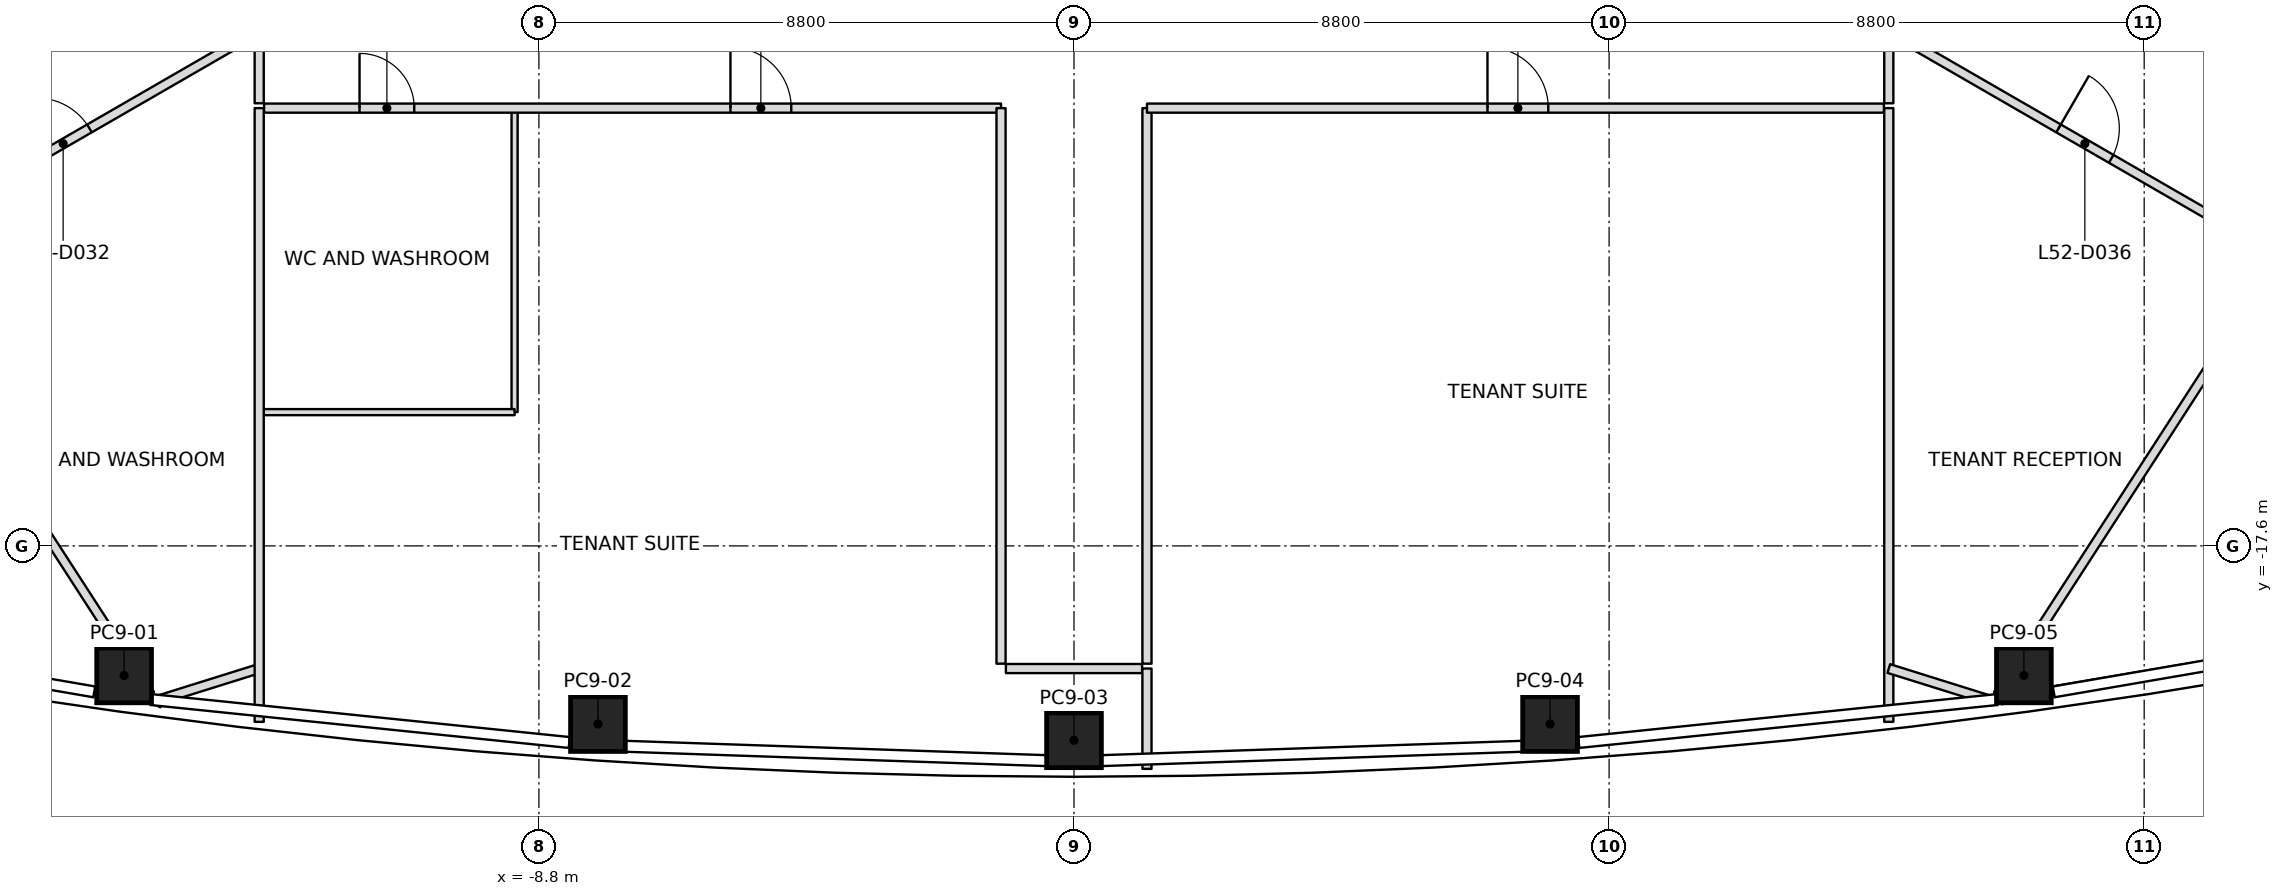
"""IFC4 building model, lengths in metres.
Left out: names, types, materials, properties, quantities, classifications, styles, units other than length and angle.
Written with IfcOpenShell. Run it as: python <this file> out.ifc"""

import sys

from ifc_helpers import new_model, si_unit, direction, frame, frame_2d, origin, origin_2d, place, context, subcontext, project, spatial, rectangle, extrude, element, fill, save


model = new_model("IFC4")
c1 = context("Model", 3, precision=1e-05, world=origin(), true_north=direction((0.0, 1.0)))
c2 = subcontext(c1, "Body", "Model", "MODEL_VIEW")
j1 = project(units=[si_unit("LENGTHUNIT", "METRE"), si_unit("PLANEANGLEUNIT", "RADIAN")], contexts=[c1])
p1 = place(None, origin())
s1 = spatial("IfcSite", under=j1, at=p1, CompositionType="ELEMENT")
p2 = place(p1, origin())
s2 = spatial("IfcBuilding", under=s1, at=p2, CompositionType="ELEMENT")
p3 = place(p2, frame((0.0, 0.0, 235.0)))
s3 = spatial("IfcBuildingStorey", under=s2, at=p3, CompositionType="ELEMENT", Elevation=235.0)
p4 = place(p3, frame((-15.622, -19.73, 0.0), z_axis=(0.017513460473, 0.010373826761, 0.999792809746), x_axis=(-0.990562226516, 0.136133815888, 0.015939246235)))
e1 = element("IfcColumn", 1, at=p4, inside=s3, PredefinedType="COLUMN", context=c2, shape_type="SweptSolid", body=[
    extrude(rectangle(XDim=0.9, YDim=0.9, at=origin_2d()), origin(), (0.0, 0.0, 1.0), 4.001),
])
p5 = place(p3, frame((-7.829, -20.53, 0.0), z_axis=(0.008788174922, 0.01116830563, 0.999899013366), x_axis=(-0.997637315828, 0.06823259627, 0.008006177268)))
e2 = element("IfcColumn", 2, at=p5, inside=s3, PredefinedType="COLUMN", context=c2, shape_type="SweptSolid", body=[
    extrude(rectangle(XDim=0.9, YDim=0.9, at=origin_2d()), origin(), (0.0, 0.0, 1.0), 4.0),
])
p6 = place(p3, frame((0.0, -20.797, 0.0), z_axis=(0.0, 0.01141283087, 0.999934871525), x_axis=(1.0, 0.0, 0.0)))
e3 = element("IfcColumn", 3, at=p6, inside=s3, PredefinedType="COLUMN", context=c2, shape_type="SweptSolid", body=[
    extrude(rectangle(XDim=0.9, YDim=0.9, at=origin_2d()), origin(), (0.0, 0.0, 1.0), 4.0),
])
p7 = place(p3, frame((7.829, -20.53, 0.0), z_axis=(-0.008788174922, 0.01116830563, 0.999899013366), x_axis=(0.997637315828, 0.06823259627, 0.008006177268)))
e4 = element("IfcColumn", 4, at=p7, inside=s3, PredefinedType="COLUMN", context=c2, shape_type="SweptSolid", body=[
    extrude(rectangle(XDim=0.9, YDim=0.9, at=origin_2d()), origin(), (0.0, 0.0, 1.0), 4.0),
])
p8 = place(p3, frame((15.622, -19.73, 0.0), z_axis=(-0.017513460473, 0.010373826761, 0.999792809746), x_axis=(0.990562226516, 0.136133815888, 0.015939246235)))
e5 = element("IfcColumn", 5, at=p8, inside=s3, PredefinedType="COLUMN", context=c2, shape_type="SweptSolid", body=[
    extrude(rectangle(XDim=0.9, YDim=0.9, at=origin_2d()), origin(), (0.0, 0.0, 1.0), 4.001),
])
p9 = place(p3, frame((-19.849, -12.845, 0.0), z_axis=(0.0, 0.0, 1.0), x_axis=(0.543041092905, -0.839706122055, 0.0)))
e6 = element("IfcWall", 6, at=p9, inside=s3, PredefinedType="PARTITIONING", context=c2, shape_type="SweptSolid", body=[
    extrude(rectangle(XDim=8.573, YDim=0.15, at=frame_2d((4.287, 0.0))), origin(), (0.0, 0.0, 1.0), 3.45),
])
p10 = place(p3, frame((-15.043, -20.131, 0.0), z_axis=(0.0, 0.0, 1.0), x_axis=(0.954404246186, 0.298517227076, 0.0)))
e7 = element("IfcWall", 7, at=p10, inside=s3, PredefinedType="PARTITIONING", context=c2, shape_type="SweptSolid", body=[
    extrude(rectangle(XDim=1.722, YDim=0.15, at=frame_2d((0.861, 0.0))), origin(), (0.0, 0.0, 1.0), 3.234),
])
p11 = place(p3, frame((-13.4, -20.494, 0.0), z_axis=(0.0, 0.0, 1.0), x_axis=(0.0, 1.0, 0.0)))
e8 = element("IfcWall", 8, at=p11, inside=s3, PredefinedType="PARTITIONING", context=c2, shape_type="SweptSolid", body=[
    extrude(rectangle(XDim=10.094, YDim=0.15, at=frame_2d((5.047, 0.0))), origin(), (0.0, 0.0, 1.0), 3.234),
])
p12 = place(p3, frame((-15.093, -20.218, 0.0), z_axis=(0.0, 0.0, 1.0), x_axis=(0.500074377092, 0.865982457891, 0.0)))
e9 = element("IfcWall", 9, at=p12, inside=s3, PredefinedType="PARTITIONING", context=c2, shape_type="SweptSolid", body=[
    extrude(rectangle(XDim=0.1, YDim=0.15, at=frame_2d((0.05, 0.0))), origin(), (0.0, 0.0, 1.0), 3.45),
])
p13 = place(p3, frame((1.2, -19.617, 0.0), z_axis=(0.0, 0.0, 1.0), x_axis=(0.0, -1.0, 0.0)))
e10 = element("IfcWall", 10, at=p13, inside=s3, PredefinedType="PARTITIONING", context=c2, shape_type="SweptSolid", body=[
    extrude(rectangle(XDim=1.65, YDim=0.15, at=frame_2d((0.825, 0.0))), origin(), (0.0, 0.0, 1.0), 3.234),
])
p14 = place(p3, frame((13.4, -10.4, 0.0), z_axis=(0.0, 0.0, 1.0), x_axis=(0.0, -1.0, 0.0)))
e11 = element("IfcWall", 11, at=p14, inside=s3, PredefinedType="PARTITIONING", context=c2, shape_type="SweptSolid", body=[
    extrude(rectangle(XDim=10.094, YDim=0.15, at=frame_2d((5.047, 0.0))), origin(), (0.0, 0.0, 1.0), 3.234),
])
p15 = place(p3, frame((13.4, -19.617, 0.0), z_axis=(0.0, 0.0, 1.0), x_axis=(0.954404246186, -0.298517227076, 0.0)))
e12 = element("IfcWall", 12, at=p15, inside=s3, PredefinedType="PARTITIONING", context=c2, shape_type="SweptSolid", body=[
    extrude(rectangle(XDim=1.722, YDim=0.15, at=frame_2d((0.861, 0.0))), origin(), (0.0, 0.0, 1.0), 3.234),
])
p16 = place(p3, frame((15.243, -20.131, 0.0), z_axis=(0.0, 0.0, 1.0), x_axis=(0.986027984185, 0.166579753886, 0.0)))
e13 = element("IfcWall", 13, at=p16, inside=s3, PredefinedType="PARTITIONING", context=c2, shape_type="SweptSolid", body=[
    extrude(rectangle(XDim=4.483, YDim=0.15, at=frame_2d((2.242, 0.0))), origin(), (0.0, 0.0, 1.0), 3.45),
])
p17 = place(p3, frame((19.849, -12.845, 0.0), z_axis=(0.0, 0.0, 1.0), x_axis=(-0.543041092905, -0.839706122055, 0.0)))
e14 = element("IfcWall", 14, at=p17, inside=s3, PredefinedType="PARTITIONING", context=c2, shape_type="SweptSolid", body=[
    extrude(rectangle(XDim=8.573, YDim=0.15, at=frame_2d((4.287, 0.0))), origin(), (0.0, 0.0, 1.0), 3.45),
])
p18 = place(p3, frame((-13.4, -6.351, 0.0), z_axis=(0.0, 0.0, 1.0), x_axis=(-0.866030434095, -0.499991287145, 0.0)))
e15 = element("IfcWall", 15, at=p18, inside=s3, PredefinedType="PARTITIONING", context=c2, shape_type="SweptSolid", body=[
    extrude(rectangle(XDim=8.752, YDim=0.15, at=frame_2d((4.376, 0.0))), origin(), (0.0, 0.0, 1.0), 3.317),
])
p19 = place(p18, frame((1.05, 0.0, 0.0)))
e16 = element("IfcOpeningElement", 16, at=p19, cuts=e15, PredefinedType="OPENING", context=c2, shape_type="SweptSolid", body=[
    extrude(rectangle(XDim=0.9, YDim=2.1, at=frame_2d((0.45, 1.05))), frame((0.0, 0.075, 0.0), z_axis=(0.0, -1.0, 0.0), x_axis=(1.0, 0.0, 0.0)), (0.0, 0.0, 1.0), 0.15),
])
p20 = place(p18, frame((5.466, 0.0, 0.0)))
e17 = element("IfcOpeningElement", 17, at=p20, cuts=e15, PredefinedType="OPENING", context=c2, shape_type="SweptSolid", body=[
    extrude(rectangle(XDim=1.0, YDim=2.1, at=frame_2d((0.5, 1.05))), frame((0.0, 0.075, 0.0), z_axis=(0.0, -1.0, 0.0), x_axis=(1.0, 0.0, 0.0)), (0.0, 0.0, 1.0), 0.15),
])
p21 = place(p3, frame((-19.78, -12.805, 0.0), z_axis=(0.0, 0.0, 1.0), x_axis=(0.866021670914, 0.500006465466, 0.0)))
e18 = element("IfcWall", 18, at=p21, inside=s3, PredefinedType="PARTITIONING", context=c2, shape_type="SweptSolid", body=[
    extrude(rectangle(XDim=7.367, YDim=0.15, at=frame_2d((3.683, 0.0))), origin(), (0.0, 0.0, 1.0), 3.233),
])
p22 = place(p21, frame((3.143, 0.0, 0.0)))
e19 = element("IfcOpeningElement", 19, at=p22, cuts=e18, PredefinedType="OPENING", context=c2, shape_type="SweptSolid", body=[
    extrude(rectangle(XDim=1.0, YDim=2.1, at=frame_2d((0.5, 1.05))), frame((0.0, 0.075, 0.0), z_axis=(0.0, -1.0, 0.0), x_axis=(1.0, 0.0, 0.0)), (0.0, 0.0, 1.0), 0.15),
])
p23 = place(p3, frame((-13.4, -9.214, 0.0), z_axis=(0.0, 0.0, 1.0), x_axis=(0.0, -1.0, 0.0)))
e20 = element("IfcWall", 20, at=p23, inside=s3, PredefinedType="PARTITIONING", context=c2, shape_type="SweptSolid", body=[
    extrude(rectangle(XDim=1.106, YDim=0.15, at=frame_2d((0.553, 0.0))), origin(), (0.0, 0.0, 1.0), 3.233),
])
p24 = place(p3, frame((-13.32, -10.4, 0.0), z_axis=(0.0, 0.0, 1.0), x_axis=(1.0, 0.0, 0.0)))
e21 = element("IfcWall", 21, at=p24, inside=s3, PredefinedType="PARTITIONING", context=c2, shape_type="SweptSolid", body=[
    extrude(rectangle(XDim=12.12, YDim=0.15, at=frame_2d((6.06, 0.0))), origin(), (0.0, 0.0, 1.0), 3.317),
])
p25 = place(p24, frame((1.57, 0.0, 0.0)))
e22 = element("IfcOpeningElement", 22, at=p25, cuts=e21, PredefinedType="OPENING", context=c2, shape_type="SweptSolid", body=[
    extrude(rectangle(XDim=0.9, YDim=2.1, at=frame_2d((0.45, 1.05))), frame((0.0, 0.075, 0.0), z_axis=(0.0, -1.0, 0.0), x_axis=(1.0, 0.0, 0.0)), (0.0, 0.0, 1.0), 0.15),
])
p26 = place(p24, frame((7.67, 0.0, 0.0)))
e23 = element("IfcOpeningElement", 23, at=p26, cuts=e21, PredefinedType="OPENING", context=c2, shape_type="SweptSolid", body=[
    extrude(rectangle(XDim=1.0, YDim=2.1, at=frame_2d((0.5, 1.05))), frame((0.0, 0.075, 0.0), z_axis=(0.0, -1.0, 0.0), x_axis=(1.0, 0.0, 0.0)), (0.0, 0.0, 1.0), 0.15),
])
p27 = place(p3, frame((-1.2, -10.4, 0.0), z_axis=(0.0, 0.0, 1.0), x_axis=(0.0, -1.0, 0.0)))
e24 = element("IfcWall", 24, at=p27, inside=s3, PredefinedType="PARTITIONING", context=c2, shape_type="SweptSolid", body=[
    extrude(rectangle(XDim=9.137, YDim=0.15, at=frame_2d((4.569, 0.0))), origin(), (0.0, 0.0, 1.0), 3.45),
])
p28 = place(p3, frame((-1.12, -19.617, 0.0), z_axis=(0.0, 0.0, 1.0), x_axis=(1.0, 0.0, 0.0)))
e25 = element("IfcWall", 25, at=p28, inside=s3, PredefinedType="PARTITIONING", context=c2, shape_type="SweptSolid", body=[
    extrude(rectangle(XDim=2.24, YDim=0.15, at=frame_2d((1.12, 0.0))), origin(), (0.0, 0.0, 1.0), 3.45),
])
p29 = place(p3, frame((1.2, -19.537, 0.0), z_axis=(0.0, 0.0, 1.0), x_axis=(0.0, 1.0, 0.0)))
e26 = element("IfcWall", 26, at=p29, inside=s3, PredefinedType="PARTITIONING", context=c2, shape_type="SweptSolid", body=[
    extrude(rectangle(XDim=9.137, YDim=0.15, at=frame_2d((4.569, 0.0))), origin(), (0.0, 0.0, 1.0), 3.45),
])
p30 = place(p3, frame((1.2, -10.4, 0.0), z_axis=(0.0, 0.0, 1.0), x_axis=(1.0, 0.0, 0.0)))
e27 = element("IfcWall", 27, at=p30, inside=s3, PredefinedType="PARTITIONING", context=c2, shape_type="SweptSolid", body=[
    extrude(rectangle(XDim=12.12, YDim=0.15, at=frame_2d((6.06, 0.0))), origin(), (0.0, 0.0, 1.0), 3.317),
])
p31 = place(p30, frame((5.6, 0.0, 0.0)))
e28 = element("IfcOpeningElement", 28, at=p31, cuts=e27, PredefinedType="OPENING", context=c2, shape_type="SweptSolid", body=[
    extrude(rectangle(XDim=1.0, YDim=2.1, at=frame_2d((0.5, 1.05))), frame((0.0, 0.075, 0.0), z_axis=(0.0, -1.0, 0.0), x_axis=(1.0, 0.0, 0.0)), (0.0, 0.0, 1.0), 0.15),
])
p32 = place(p3, frame((13.4, -10.32, 0.0), z_axis=(0.0, 0.0, 1.0), x_axis=(0.0, 1.0, 0.0)))
e29 = element("IfcWall", 29, at=p32, inside=s3, PredefinedType="PARTITIONING", context=c2, shape_type="SweptSolid", body=[
    extrude(rectangle(XDim=1.198, YDim=0.15, at=frame_2d((0.599, 0.0))), origin(), (0.0, 0.0, 1.0), 3.233),
])
p33 = place(p3, frame((13.479, -9.168, 0.0), z_axis=(0.0, 0.0, 1.0), x_axis=(0.866026872144, -0.499997456718, 0.0)))
e30 = element("IfcWall", 30, at=p33, inside=s3, PredefinedType="PARTITIONING", context=c2, shape_type="SweptSolid", body=[
    extrude(rectangle(XDim=7.275, YDim=0.15, at=frame_2d((3.637, 0.0))), origin(), (0.0, 0.0, 1.0), 3.233),
])
p34 = place(p33, frame((3.132, 0.0, 0.0)))
e31 = element("IfcOpeningElement", 31, at=p34, cuts=e30, PredefinedType="OPENING", context=c2, shape_type="SweptSolid", body=[
    extrude(rectangle(XDim=1.0, YDim=2.1, at=frame_2d((0.5, 1.05))), frame((0.0, 0.075, 0.0), z_axis=(0.0, -1.0, 0.0), x_axis=(1.0, 0.0, 0.0)), (0.0, 0.0, 1.0), 0.15),
])
p35 = place(p3, frame((20.979, -10.727, 0.0), z_axis=(0.0, 0.0, 1.0), x_axis=(-0.866030434095, 0.499991287145, 0.0)))
e32 = element("IfcWall", 32, at=p35, inside=s3, PredefinedType="PARTITIONING", context=c2, shape_type="SweptSolid", body=[
    extrude(rectangle(XDim=8.752, YDim=0.15, at=frame_2d((4.376, 0.0))), origin(), (0.0, 0.0, 1.0), 3.317),
])
p36 = place(p35, frame((0.97, 0.0, 0.0)))
e33 = element("IfcOpeningElement", 33, at=p36, cuts=e32, PredefinedType="OPENING", context=c2, shape_type="SweptSolid", body=[
    extrude(rectangle(XDim=0.9, YDim=2.1, at=frame_2d((0.45, 1.05))), frame((0.0, 0.075, 0.0), z_axis=(0.0, -1.0, 0.0), x_axis=(1.0, 0.0, 0.0)), (0.0, 0.0, 1.0), 0.15),
])
p37 = place(p35, frame((5.386, 0.0, 0.0)))
e34 = element("IfcOpeningElement", 34, at=p37, cuts=e32, PredefinedType="OPENING", context=c2, shape_type="SweptSolid", body=[
    extrude(rectangle(XDim=1.0, YDim=2.1, at=frame_2d((0.5, 1.05))), frame((0.0, 0.075, 0.0), z_axis=(0.0, -1.0, 0.0), x_axis=(1.0, 0.0, 0.0)), (0.0, 0.0, 1.0), 0.15),
])
p38 = place(p3, frame((-9.2, -10.43, 0.0), z_axis=(0.0, 0.0, 1.0), x_axis=(0.0, -1.0, 0.0)))
e35 = element("IfcWall", 35, at=p38, inside=s3, PredefinedType="PARTITIONING", context=c2, shape_type="SweptSolid", body=[
    extrude(rectangle(XDim=4.97, YDim=0.1, at=frame_2d((2.485, 0.0))), origin(), (0.0, 0.0, 1.0), 3.45),
])
p39 = place(p3, frame((-9.2, -15.4, 0.0), z_axis=(0.0, 0.0, 1.0), x_axis=(-1.0, 0.0, 0.0)))
e36 = element("IfcWall", 36, at=p39, inside=s3, PredefinedType="PARTITIONING", context=c2, shape_type="SweptSolid", body=[
    extrude(rectangle(XDim=4.17, YDim=0.1, at=frame_2d((2.085, 0.0))), origin(), (0.0, 0.0, 1.0), 3.393),
])
p40 = place(p22, origin())
e37 = element("IfcDoor", 37, at=p40, inside=s3, OperationType="SINGLE_SWING_LEFT", PredefinedType="DOOR", context=c2, shape_type="SweptSolid", body=[
    extrude(rectangle(XDim=1.0, YDim=2.1, at=frame_2d((0.5, 1.05))), frame((0.0, 0.025, 0.0), z_axis=(0.0, -1.0, 0.0), x_axis=(1.0, 0.0, 0.0)), (0.0, 0.0, 1.0), 0.05),
])
fill(e19, e37)
p41 = place(p25, origin())
e38 = element("IfcDoor", 38, at=p41, inside=s3, OperationType="SINGLE_SWING_LEFT", PredefinedType="DOOR", context=c2, shape_type="SweptSolid", body=[
    extrude(rectangle(XDim=0.9, YDim=2.1, at=frame_2d((0.45, 1.05))), frame((0.0, 0.025, 0.0), z_axis=(0.0, -1.0, 0.0), x_axis=(1.0, 0.0, 0.0)), (0.0, 0.0, 1.0), 0.05),
])
fill(e22, e38)
p42 = place(p26, origin())
e39 = element("IfcDoor", 39, at=p42, inside=s3, OperationType="SINGLE_SWING_LEFT", PredefinedType="DOOR", context=c2, shape_type="SweptSolid", body=[
    extrude(rectangle(XDim=1.0, YDim=2.1, at=frame_2d((0.5, 1.05))), frame((0.0, 0.025, 0.0), z_axis=(0.0, -1.0, 0.0), x_axis=(1.0, 0.0, 0.0)), (0.0, 0.0, 1.0), 0.05),
])
fill(e23, e39)
p43 = place(p31, origin())
e40 = element("IfcDoor", 40, at=p43, inside=s3, OperationType="SINGLE_SWING_LEFT", PredefinedType="DOOR", context=c2, shape_type="SweptSolid", body=[
    extrude(rectangle(XDim=1.0, YDim=2.1, at=frame_2d((0.5, 1.05))), frame((0.0, 0.025, 0.0), z_axis=(0.0, -1.0, 0.0), x_axis=(1.0, 0.0, 0.0)), (0.0, 0.0, 1.0), 0.05),
])
fill(e28, e40)
p44 = place(p34, origin())
e41 = element("IfcDoor", 41, at=p44, inside=s3, OperationType="SINGLE_SWING_RIGHT", PredefinedType="DOOR", context=c2, shape_type="SweptSolid", body=[
    extrude(rectangle(XDim=1.0, YDim=2.1, at=frame_2d((0.5, 1.05))), frame((0.0, 0.025, 0.0), z_axis=(0.0, -1.0, 0.0), x_axis=(1.0, 0.0, 0.0)), (0.0, 0.0, 1.0), 0.05),
])
fill(e31, e41)
save(model, sys.argv[1])
